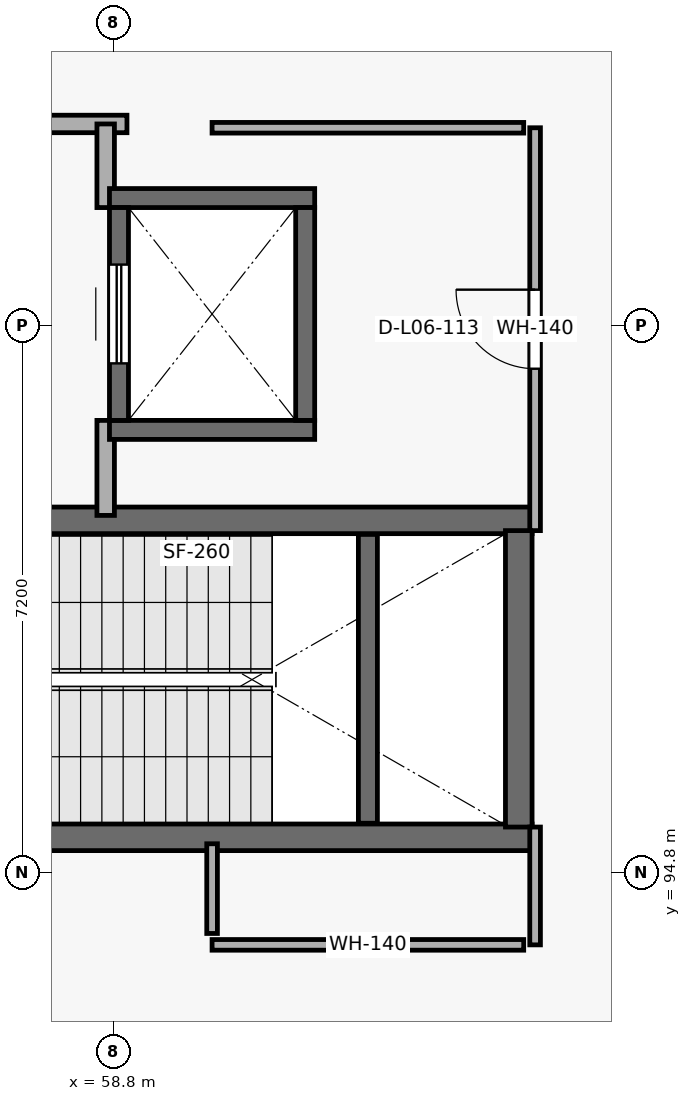
"""IFC4 building model, lengths in metres.
Left out: names, types, materials, properties, quantities, classifications, styles, units other than length and angle.
Written with IfcOpenShell. Run it as: python <this file> out.ifc"""

import sys

from ifc_helpers import new_model, si_unit, direction, frame, frame_2d, origin, place, context, subcontext, project, spatial, rectangle, extrude, element, fill, save


model = new_model("IFC4")
c1 = context("Model", 3, precision=1e-05, world=origin(), true_north=direction((0.0, 1.0)))
c2 = subcontext(c1, "Body", "Model", "MODEL_VIEW")
j1 = project(units=[si_unit("LENGTHUNIT", "METRE"), si_unit("PLANEANGLEUNIT", "RADIAN")], contexts=[c1])
p1 = place(None, origin())
s1 = spatial("IfcSite", under=j1, at=p1, CompositionType="ELEMENT")
p2 = place(p1, origin())
s2 = spatial("IfcBuilding", under=s1, at=p2, CompositionType="ELEMENT")
p3 = place(p2, frame((0.0, 0.0, 25.5)))
s3 = spatial("IfcBuildingStorey", under=s2, at=p3, CompositionType="ELEMENT", Elevation=25.5)
p4 = place(p3, frame((55.09, 95.265, 0.0), z_axis=(0.0, 0.0, 1.0), x_axis=(1.0, 0.0, 0.0)))
e1 = element("IfcWall", 1, at=p4, inside=s3, PredefinedType="SHEAR", context=c2, shape_type="SweptSolid", body=[
    extrude(rectangle(XDim=9.22, YDim=0.35, at=frame_2d((4.61, 0.0))), origin(), (0.0, 0.0, 1.0), 4.82),
])
p5 = place(p4, frame((0.45, 0.0, 0.0)))
e2 = element("IfcOpeningElement", 2, at=p5, cuts=e1, PredefinedType="OPENING", context=c2, shape_type="SweptSolid", body=[
    extrude(rectangle(XDim=1.25, YDim=2.2, at=frame_2d((0.625, 1.1))), frame((0.0, 0.185, 0.0), z_axis=(0.0, -1.0, 0.0), x_axis=(1.0, 0.0, 0.0)), (0.0, 0.0, 1.0), 0.37),
])
p6 = place(p3, frame((64.31, 99.435, 0.0), z_axis=(0.0, 0.0, 1.0), x_axis=(-1.0, 0.0, 0.0)))
e3 = element("IfcWall", 3, at=p6, inside=s3, PredefinedType="SHEAR", context=c2, shape_type="SweptSolid", body=[
    extrude(rectangle(XDim=9.22, YDim=0.35, at=frame_2d((4.61, 0.0))), origin(), (0.0, 0.0, 1.0), 4.82),
])
p7 = place(p6, frame((7.72, 0.0, 0.0)))
e4 = element("IfcOpeningElement", 4, at=p7, cuts=e3, PredefinedType="OPENING", context=c2, shape_type="SweptSolid", body=[
    extrude(rectangle(XDim=1.2, YDim=2.2, at=frame_2d((0.6, 1.1))), frame((0.0, 0.185, 0.0), z_axis=(0.0, -1.0, 0.0), x_axis=(1.0, 0.0, 0.0)), (0.0, 0.0, 1.0), 0.37),
])
p8 = place(p3, frame((64.135, 99.3, 0.0), z_axis=(0.0, 0.0, 1.0), x_axis=(0.0, -1.0, 0.0)))
e5 = element("IfcWall", 5, at=p8, inside=s3, PredefinedType="SHEAR", context=c2, shape_type="SweptSolid", body=[
    extrude(rectangle(XDim=3.9, YDim=0.35, at=frame_2d((1.95, 0.0))), origin(), (0.0, 0.0, 1.0), 4.82),
])
p9 = place(p3, frame((62.15, 95.45, 0.0), z_axis=(0.0, 0.0, 1.0), x_axis=(0.0, 1.0, 0.0)))
e6 = element("IfcWall", 6, at=p9, inside=s3, PredefinedType="SHEAR", context=c2, shape_type="SweptSolid", body=[
    extrude(rectangle(XDim=3.8, YDim=0.25, at=frame_2d((1.9, 0.0))), origin(), (0.0, 0.0, 1.0), 2.37),
])
p10 = place(p3, frame((55.09, 104.65, 0.0), z_axis=(0.0, 0.0, 1.0), x_axis=(1.0, 0.0, 0.0)))
e7 = element("IfcWall", 7, at=p10, inside=s3, PredefinedType="PARTITIONING", context=c2, shape_type="SweptSolid", body=[
    extrude(rectangle(XDim=3.89, YDim=0.23, at=frame_2d((1.945, 0.0))), origin(), (0.0, 0.0, 1.0), 4.82),
])
p11 = place(p10, frame((1.15, 0.0, 0.0)))
e8 = element("IfcOpeningElement", 8, at=p11, cuts=e7, PredefinedType="OPENING", context=c2, shape_type="SweptSolid", body=[
    extrude(rectangle(XDim=1.2, YDim=2.2, at=frame_2d((0.6, 1.1))), frame((0.0, 0.125, 0.0), z_axis=(0.0, -1.0, 0.0), x_axis=(1.0, 0.0, 0.0)), (0.0, 0.0, 1.0), 0.25),
])
p12 = place(p3, frame((58.7, 104.65, 0.0), z_axis=(0.0, 0.0, 1.0), x_axis=(0.0, -1.0, 0.0)))
e9 = element("IfcWall", 9, at=p12, inside=s3, PredefinedType="PARTITIONING", context=c2, shape_type="SweptSolid", body=[
    extrude(rectangle(XDim=1.1, YDim=0.23, at=frame_2d((0.55, 0.0))), origin(), (0.0, 0.0, 1.0), 4.82),
])
p13 = place(p3, frame((58.7, 100.75, 0.0), z_axis=(0.0, 0.0, 1.0), x_axis=(0.0, -1.0, 0.0)))
e10 = element("IfcWall", 10, at=p13, inside=s3, PredefinedType="PARTITIONING", context=c2, shape_type="SweptSolid", body=[
    extrude(rectangle(XDim=1.25, YDim=0.23, at=frame_2d((0.625, 0.0))), origin(), (0.0, 0.0, 1.0), 4.82),
])
for number, where, z_axis, x_axis in (
    (11, (58.75, 100.625, 0.0), (0.0, 0.0, 1.0), (1.0, 0.0, 0.0)),
    (12, (61.45, 103.675, 0.0), (0.0, 0.0, 1.0), (-1.0, 0.0, 0.0)),
):
    element("IfcWall", number, at=place(p3, frame(where, z_axis=z_axis, x_axis=x_axis)), inside=s3, PredefinedType="SHEAR", context=c2, shape_type="SweptSolid", body=[
        extrude(rectangle(XDim=2.7, YDim=0.25, at=frame_2d((1.35, 0.0))), origin(), (0.0, 0.0, 1.0), 4.82),
    ])
p14 = place(p3, frame((58.875, 100.75, 0.0), z_axis=(0.0, 0.0, 1.0), x_axis=(0.0, 1.0, 0.0)))
e13 = element("IfcWall", 13, at=p14, inside=s3, PredefinedType="SHEAR", context=c2, shape_type="SweptSolid", body=[
    extrude(rectangle(XDim=2.8, YDim=0.25, at=frame_2d((1.4, 0.0))), origin(), (0.0, 0.0, 1.0), 4.82),
])
p15 = place(p14, frame((0.75, 0.0, 0.0)))
e14 = element("IfcOpeningElement", 14, at=p15, cuts=e13, PredefinedType="OPENING", context=c2, shape_type="SweptSolid", body=[
    extrude(rectangle(XDim=1.3, YDim=2.25, at=frame_2d((0.65, 1.125))), frame((0.0, 0.135, 0.0), z_axis=(0.0, -1.0, 0.0), x_axis=(1.0, 0.0, 0.0)), (0.0, 0.0, 1.0), 0.27),
])
p16 = place(p3, frame((61.325, 103.55, 0.0), z_axis=(0.0, 0.0, 1.0), x_axis=(0.0, -1.0, 0.0)))
e15 = element("IfcWall", 15, at=p16, inside=s3, PredefinedType="SHEAR", context=c2, shape_type="SweptSolid", body=[
    extrude(rectangle(XDim=2.8, YDim=0.25, at=frame_2d((1.4, 0.0))), origin(), (0.0, 0.0, 1.0), 4.82),
])
p17 = place(p3, frame((64.35, 104.6, 0.0), z_axis=(0.0, 0.0, 1.0), x_axis=(0.0, -1.0, 0.0)))
e16 = element("IfcWall", 16, at=p17, inside=s3, PredefinedType="PARTITIONING", context=c2, shape_type="SweptSolid", body=[
    extrude(rectangle(XDim=5.3, YDim=0.14, at=frame_2d((2.65, 0.0))), origin(), (0.0, 0.0, 1.0), 4.82),
])
p18 = place(p17, frame((2.13, 0.0, 0.0)))
e17 = element("IfcOpeningElement", 17, at=p18, cuts=e16, PredefinedType="OPENING", context=c2, shape_type="SweptSolid", body=[
    extrude(rectangle(XDim=1.04, YDim=2.26, at=frame_2d((0.52, 1.13))), frame((0.0, 0.08, 0.0), z_axis=(0.0, -1.0, 0.0), x_axis=(1.0, 0.0, 0.0)), (0.0, 0.0, 1.0), 0.16),
])
p19 = place(p3, frame((64.35, 95.4, 0.0), z_axis=(0.0, 0.0, 1.0), x_axis=(0.0, -1.0, 0.0)))
e18 = element("IfcWall", 18, at=p19, inside=s3, PredefinedType="PARTITIONING", context=c2, shape_type="SweptSolid", body=[
    extrude(rectangle(XDim=1.55, YDim=0.14, at=frame_2d((0.775, 0.0))), origin(), (0.0, 0.0, 1.0), 4.82),
])
for number, where, z_axis, x_axis in (
    (19, (60.1, 104.6, 0.0), (0.0, 0.0, 1.0), (1.0, 0.0, 0.0)),
    (20, (64.2, 93.85, 0.0), (0.0, 0.0, 1.0), (-1.0, 0.0, 0.0)),
):
    element("IfcWall", number, at=place(p3, frame(where, z_axis=z_axis, x_axis=x_axis)), inside=s3, PredefinedType="PARTITIONING", context=c2, shape_type="SweptSolid", body=[
        extrude(rectangle(XDim=4.1, YDim=0.14, at=frame_2d((2.05, 0.0))), origin(), (0.0, 0.0, 1.0), 4.82),
    ])
p20 = place(p3, frame((60.1, 94.0, 0.0), z_axis=(0.0, 0.0, 1.0), x_axis=(0.0, 1.0, 0.0)))
e21 = element("IfcWall", 21, at=p20, inside=s3, PredefinedType="PARTITIONING", context=c2, shape_type="SweptSolid", body=[
    extrude(rectangle(XDim=1.18, YDim=0.14, at=frame_2d((0.59, 0.0))), origin(), (0.0, 0.0, 1.0), 4.82),
])
p21 = place(p15, origin())
e22 = element("IfcDoor", 22, at=p21, inside=s3, OperationType="SLIDING_TO_LEFT", PredefinedType="DOOR", context=c2, shape_type="SweptSolid", body=[
    extrude(rectangle(XDim=1.3, YDim=2.25, at=frame_2d((0.65, 1.125))), frame((0.0, 0.025, 0.0), z_axis=(0.0, -1.0, 0.0), x_axis=(1.0, 0.0, 0.0)), (0.0, 0.0, 1.0), 0.05),
])
fill(e14, e22)
p22 = place(p18, origin())
e23 = element("IfcDoor", 23, at=p22, inside=s3, OperationType="SINGLE_SWING_RIGHT", PredefinedType="DOOR", context=c2, shape_type="SweptSolid", body=[
    extrude(rectangle(XDim=1.04, YDim=2.26, at=frame_2d((0.52, 1.13))), frame((0.0, 0.025, 0.0), z_axis=(0.0, -1.0, 0.0), x_axis=(1.0, 0.0, 0.0)), (0.0, 0.0, 1.0), 0.05),
])
fill(e17, e23)
save(model, sys.argv[1])
